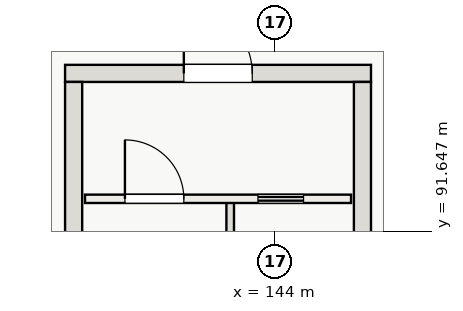
"""IFC4 building model, lengths in metres.
Left out: names, types, materials, properties, quantities, classifications, styles, units other than length and angle.
Written with IfcOpenShell. Run it as: python <this file> out.ifc"""

import sys

from ifc_helpers import new_model, si_unit, direction, frame, frame_2d, origin, place, context, subcontext, project, spatial, rectangle, extrude, element, fill, save


model = new_model("IFC4")
c1 = context("Model", 3, precision=1e-05, world=origin(), true_north=direction((0.0, 1.0)))
c2 = subcontext(c1, "Body", "Model", "MODEL_VIEW")
j1 = project(units=[si_unit("LENGTHUNIT", "METRE"), si_unit("PLANEANGLEUNIT", "RADIAN")], contexts=[c1])
p1 = place(None, origin())
s1 = spatial("IfcSite", under=j1, at=p1, CompositionType="ELEMENT")
p2 = place(p1, origin())
s2 = spatial("IfcBuilding", under=s1, at=p2, CompositionType="ELEMENT")
p3 = place(p2, frame((0.0, 0.0, -4.8)))
s3 = spatial("IfcBuildingStorey", under=s2, at=p3, CompositionType="ELEMENT", Elevation=-4.8)
p4 = place(p3, frame((138.475, 95.8, -0.45), z_axis=(0.0, 0.0, 1.0), x_axis=(1.0, 0.0, 0.0)))
e1 = element("IfcWall", 1, at=p4, inside=s3, PredefinedType="SHEAR", context=c2, shape_type="SweptSolid", body=[
    extrude(rectangle(XDim=8.05, YDim=0.45, at=frame_2d((4.025, 0.0))), origin(), (0.0, 0.0, 1.0), 5.25),
])
p5 = place(p4, frame((3.125, 0.0, 0.45)))
e2 = element("IfcOpeningElement", 2, at=p5, cuts=e1, PredefinedType="OPENING", context=c2, shape_type="SweptSolid", body=[
    extrude(rectangle(XDim=1.8, YDim=2.3, at=frame_2d((0.9, 1.15))), frame((0.0, 0.235, 0.0), z_axis=(0.0, -1.0, 0.0), x_axis=(1.0, 0.0, 0.0)), (0.0, 0.0, 1.0), 0.47),
])
for number, where, z_axis, x_axis in (
    (3, (138.7, 84.425, -0.45), (0.0, 0.0, 1.0), (0.0, 1.0, 0.0)),
    (4, (146.3, 84.425, -0.45), (0.0, 0.0, 1.0), (0.0, 1.0, 0.0)),
):
    element("IfcWall", number, at=place(p3, frame(where, z_axis=z_axis, x_axis=x_axis)), inside=s3, PredefinedType="SHEAR", context=c2, shape_type="SweptSolid", body=[
        extrude(rectangle(XDim=11.15, YDim=0.45, at=frame_2d((5.575, 0.0))), origin(), (0.0, 0.0, 1.0), 5.25),
    ])
p6 = place(p3, frame((142.82, 84.45, -0.45), z_axis=(0.0, 0.0, 1.0), x_axis=(0.0, 1.0, 0.0)))
e5 = element("IfcWall", 5, at=p6, inside=s3, PredefinedType="SOLIDWALL", context=c2, shape_type="SweptSolid", body=[
    extrude(rectangle(XDim=8.0, YDim=0.2, at=frame_2d((4.0, 0.0))), origin(), (0.0, 0.0, 1.0), 5.25),
])
p7 = place(p3, frame((139.0, 92.5, 0.0), z_axis=(0.0, 0.0, 1.0), x_axis=(1.0, 0.0, 0.0)))
e6 = element("IfcWall", 6, at=p7, inside=s3, PredefinedType="SOLIDWALL", context=c2, shape_type="SweptSolid", body=[
    extrude(rectangle(XDim=7.0, YDim=0.22, at=frame_2d((3.5, 0.0))), origin(), (0.0, 0.0, 1.0), 4.4),
])
p8 = place(p7, frame((1.05, 0.0, 0.0)))
e7 = element("IfcOpeningElement", 7, at=p8, cuts=e6, PredefinedType="OPENING", context=c2, shape_type="SweptSolid", body=[
    extrude(rectangle(XDim=1.55, YDim=2.2, at=frame_2d((0.775, 1.1))), frame((0.0, 0.12, 0.0), z_axis=(0.0, -1.0, 0.0), x_axis=(1.0, 0.0, 0.0)), (0.0, 0.0, 1.0), 0.24),
])
p9 = place(p7, frame((4.55, 0.0, 0.0)))
e8 = element("IfcOpeningElement", 8, at=p9, cuts=e6, PredefinedType="OPENING", context=c2, shape_type="SweptSolid", body=[
    extrude(rectangle(XDim=1.2, YDim=2.2, at=frame_2d((0.6, 1.1))), frame((0.0, 0.12, 0.0), z_axis=(0.0, -1.0, 0.0), x_axis=(1.0, 0.0, 0.0)), (0.0, 0.0, 1.0), 0.24),
])
p10 = place(p8, origin())
e9 = element("IfcDoor", 9, at=p10, inside=s3, OperationType="SINGLE_SWING_LEFT", PredefinedType="DOOR", context=c2, shape_type="SweptSolid", body=[
    extrude(rectangle(XDim=1.55, YDim=2.2, at=frame_2d((0.775, 1.1))), frame((0.0, 0.025, 0.0), z_axis=(0.0, -1.0, 0.0), x_axis=(1.0, 0.0, 0.0)), (0.0, 0.0, 1.0), 0.05),
])
fill(e7, e9)
p11 = place(p9, origin())
e10 = element("IfcDoor", 10, at=p11, inside=s3, OperationType="SLIDING_TO_LEFT", PredefinedType="DOOR", context=c2, shape_type="SweptSolid", body=[
    extrude(rectangle(XDim=1.2, YDim=2.2, at=frame_2d((0.6, 1.1))), frame((0.0, 0.025, 0.0), z_axis=(0.0, -1.0, 0.0), x_axis=(1.0, 0.0, 0.0)), (0.0, 0.0, 1.0), 0.05),
])
fill(e8, e10)
p12 = place(p5, origin())
e11 = element("IfcDoor", 11, at=p12, inside=s3, OperationType="DOUBLE_DOOR_SINGLE_SWING", PredefinedType="DOOR", context=c2, shape_type="SweptSolid", body=[
    extrude(rectangle(XDim=1.8, YDim=2.3, at=frame_2d((0.9, 1.15))), frame((0.0, 0.025, 0.0), z_axis=(0.0, -1.0, 0.0), x_axis=(1.0, 0.0, 0.0)), (0.0, 0.0, 1.0), 0.05),
])
fill(e2, e11)
save(model, sys.argv[1])
